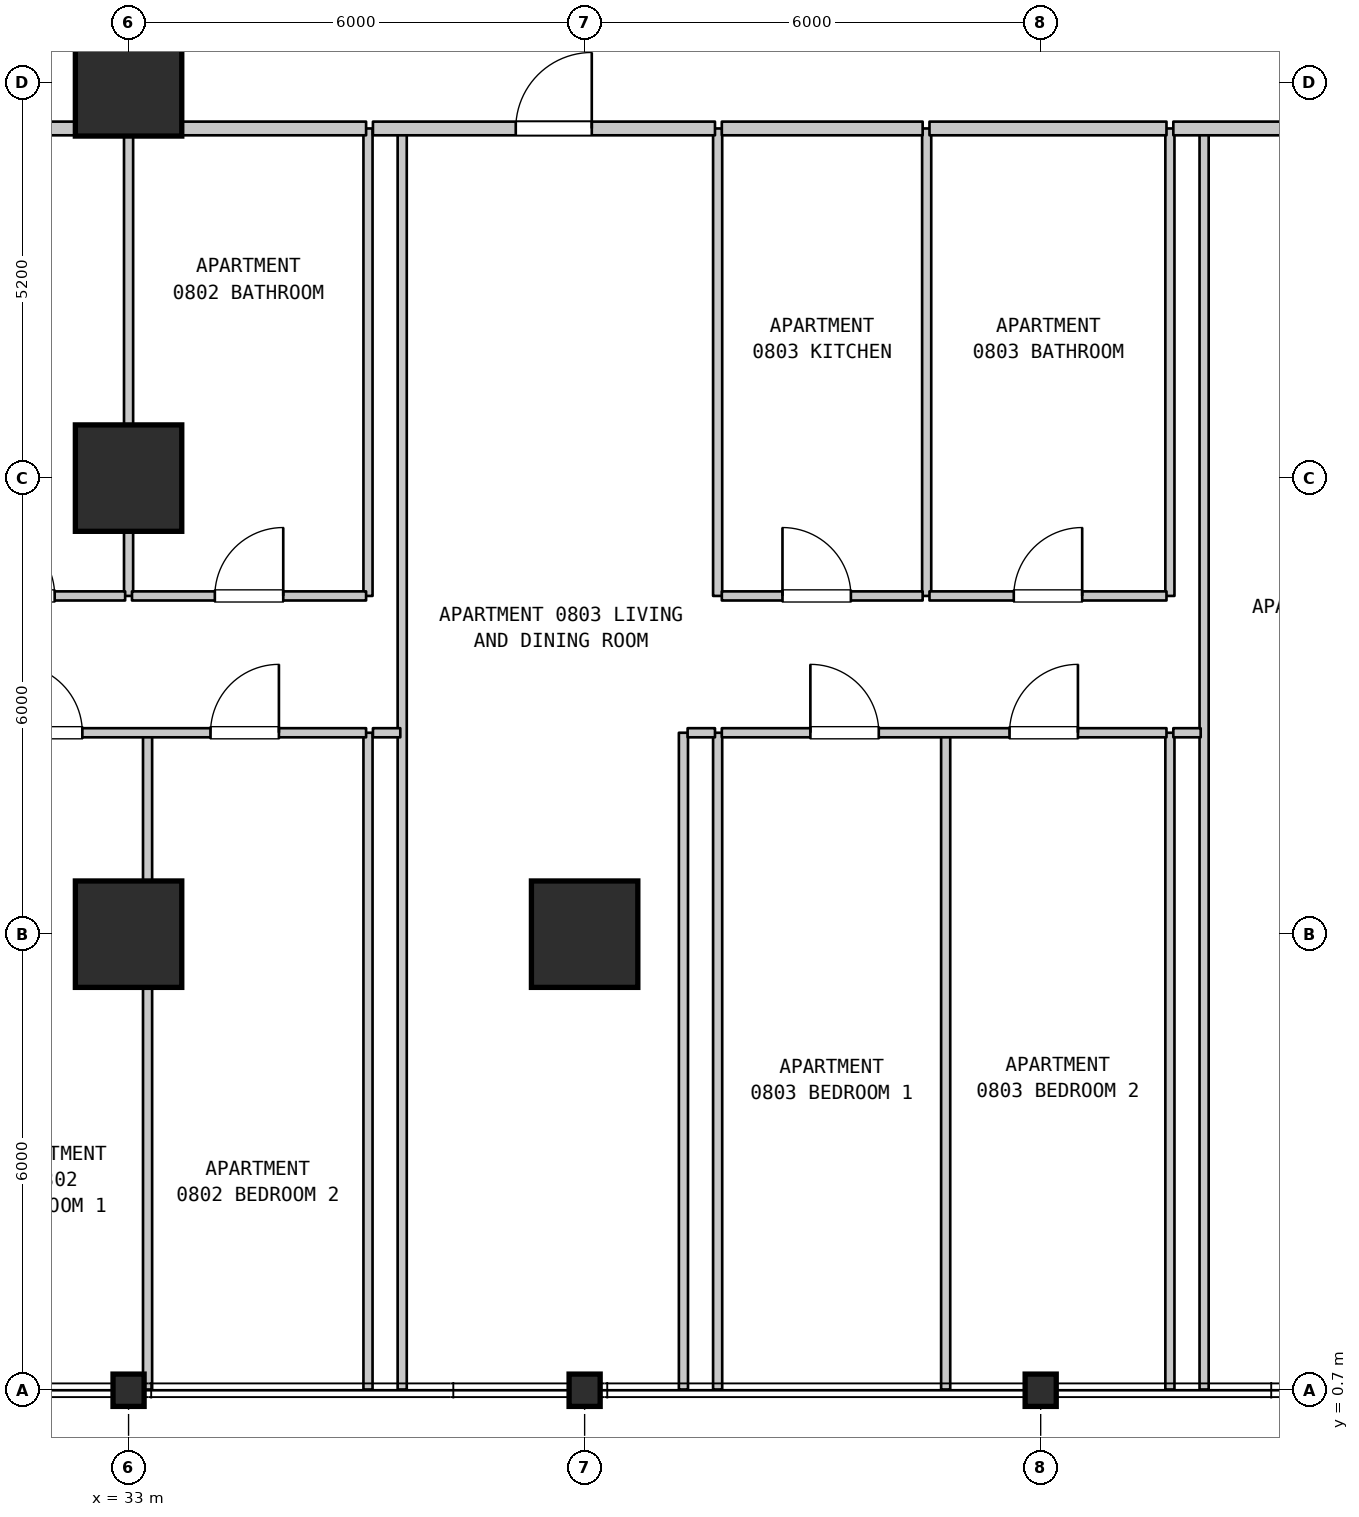
"""IFC4 building model, lengths in metres.
Left out: names, types, materials, properties, quantities, classifications, styles, units other than length and angle.
Written with IfcOpenShell. Run it as: python <this file> out.ifc"""

import sys

from ifc_helpers import new_model, si_unit, direction, frame, frame_2d, origin, origin_2d, place, context, subcontext, project, spatial, rectangle, i_section, extrude, element, fill, save


model = new_model("IFC4")
c1 = context("Model", 3, precision=1e-05, world=origin(), true_north=direction((0.0, 1.0)))
c2 = subcontext(c1, "Body", "Model", "MODEL_VIEW")
j1 = project(units=[si_unit("LENGTHUNIT", "METRE"), si_unit("PLANEANGLEUNIT", "RADIAN")], contexts=[c1])
p1 = place(None, origin())
s1 = spatial("IfcSite", under=j1, at=p1, CompositionType="ELEMENT")
p2 = place(p1, origin())
s2 = spatial("IfcBuilding", under=s1, at=p2, CompositionType="ELEMENT")
p3 = place(p2, frame((0.0, 0.0, 38.8)))
s3 = spatial("IfcBuildingStorey", under=s2, at=p3, CompositionType="ELEMENT", Elevation=38.8)
p4 = place(p3, frame((33.0, 0.7, 0.0), z_axis=(0.0, 0.0, 1.0), x_axis=(1.0, 0.0, 0.0)))
e1 = element("IfcColumn", 1, at=p4, inside=s3, PredefinedType="COLUMN", context=c2, shape_type="SweptSolid", body=[
    extrude(i_section(OverallWidth=0.409, OverallDepth=0.425, WebThickness=0.032, FlangeThickness=0.052, FilletRadius=0.015, at=origin_2d()), origin(), (0.0, 0.0, 1.0), 3.7),
])
for number, where, z_axis, x_axis in (
    (2, (33.0, 6.7, 0.0), (0.0, 0.0, 1.0), (1.0, 0.0, 0.0)),
    (3, (33.0, 12.7, 0.0), (0.0, 0.0, 1.0), (1.0, 0.0, 0.0)),
    (4, (33.0, 17.9, 0.0), (0.0, 0.0, 1.0), (1.0, 0.0, 0.0)),
):
    element("IfcColumn", number, at=place(p3, frame(where, z_axis=z_axis, x_axis=x_axis)), inside=s3, PredefinedType="COLUMN", context=c2, shape_type="SweptSolid", body=[
        extrude(rectangle(XDim=1.4, YDim=1.4, at=origin_2d()), origin(), (0.0, 0.0, 1.0), 3.7),
    ])
p5 = place(p3, frame((39.0, 0.7, 0.0), z_axis=(0.0, 0.0, 1.0), x_axis=(1.0, 0.0, 0.0)))
e5 = element("IfcColumn", 5, at=p5, inside=s3, PredefinedType="COLUMN", context=c2, shape_type="SweptSolid", body=[
    extrude(i_section(OverallWidth=0.409, OverallDepth=0.425, WebThickness=0.032, FlangeThickness=0.052, FilletRadius=0.015, at=origin_2d()), origin(), (0.0, 0.0, 1.0), 3.7),
])
p6 = place(p3, frame((39.0, 6.7, 0.0), z_axis=(0.0, 0.0, 1.0), x_axis=(1.0, 0.0, 0.0)))
e6 = element("IfcColumn", 6, at=p6, inside=s3, PredefinedType="COLUMN", context=c2, shape_type="SweptSolid", body=[
    extrude(rectangle(XDim=1.4, YDim=1.4, at=origin_2d()), origin(), (0.0, 0.0, 1.0), 3.7),
])
p7 = place(p3, frame((45.0, 0.7, 0.0), z_axis=(0.0, 0.0, 1.0), x_axis=(1.0, 0.0, 0.0)))
e7 = element("IfcColumn", 7, at=p7, inside=s3, PredefinedType="COLUMN", context=c2, shape_type="SweptSolid", body=[
    extrude(i_section(OverallWidth=0.409, OverallDepth=0.425, WebThickness=0.032, FlangeThickness=0.052, FilletRadius=0.015, at=origin_2d()), origin(), (0.0, 0.0, 1.0), 3.7),
])
p8 = place(p3, frame((33.0, 11.15, 0.0), z_axis=(0.0, 0.0, 1.0), x_axis=(0.0, 1.0, 0.0)))
e8 = element("IfcWall", 8, at=p8, inside=s3, PredefinedType="PARTITIONING", context=c2, shape_type="SweptSolid", body=[
    extrude(rectangle(XDim=6.15, YDim=0.12, at=frame_2d((3.075, 0.0))), origin(), (0.0, 0.0, 1.0), 2.885),
])
for number, where, z_axis, x_axis in (
    (9, (33.25, 0.71, 0.0), (0.0, 0.0, 1.0), (0.0, 1.0, 0.0)),
    (10, (36.15, 0.71, 0.0), (0.0, 0.0, 1.0), (0.0, 1.0, 0.0)),
):
    element("IfcWall", number, at=place(p3, frame(where, z_axis=z_axis, x_axis=x_axis)), inside=s3, PredefinedType="PARTITIONING", context=c2, shape_type="SweptSolid", body=[
        extrude(rectangle(XDim=8.64, YDim=0.12, at=frame_2d((4.32, 0.0))), origin(), (0.0, 0.0, 1.0), 3.385),
    ])
p9 = place(p3, frame((36.15, 11.15, 0.0), z_axis=(0.0, 0.0, 1.0), x_axis=(0.0, 1.0, 0.0)))
e11 = element("IfcWall", 11, at=p9, inside=s3, PredefinedType="PARTITIONING", context=c2, shape_type="SweptSolid", body=[
    extrude(rectangle(XDim=6.15, YDim=0.12, at=frame_2d((3.075, 0.0))), origin(), (0.0, 0.0, 1.0), 3.385),
])
p10 = place(p3, frame((36.6, 0.71, 0.0), z_axis=(0.0, 0.0, 1.0), x_axis=(0.0, 1.0, 0.0)))
e12 = element("IfcWall", 12, at=p10, inside=s3, PredefinedType="PARTITIONING", context=c2, shape_type="SweptSolid", body=[
    extrude(rectangle(XDim=16.59, YDim=0.12, at=frame_2d((8.295, 0.0))), origin(), (0.0, 0.0, 1.0), 3.385),
])
for number, where, z_axis, x_axis in (
    (13, (40.3, 0.71, 0.0), (0.0, 0.0, 1.0), (0.0, 1.0, 0.0)),
    (14, (40.75, 0.71, 0.0), (0.0, 0.0, 1.0), (0.0, 1.0, 0.0)),
):
    element("IfcWall", number, at=place(p3, frame(where, z_axis=z_axis, x_axis=x_axis)), inside=s3, PredefinedType="PARTITIONING", context=c2, shape_type="SweptSolid", body=[
        extrude(rectangle(XDim=8.64, YDim=0.12, at=frame_2d((4.32, 0.0))), origin(), (0.0, 0.0, 1.0), 3.385),
    ])
for number, where, z_axis, x_axis in (
    (15, (40.75, 11.15, 0.0), (0.0, 0.0, 1.0), (0.0, 1.0, 0.0)),
    (16, (43.5, 11.15, 0.0), (0.0, 0.0, 1.0), (0.0, 1.0, 0.0)),
):
    element("IfcWall", number, at=place(p3, frame(where, z_axis=z_axis, x_axis=x_axis)), inside=s3, PredefinedType="PARTITIONING", context=c2, shape_type="SweptSolid", body=[
        extrude(rectangle(XDim=6.15, YDim=0.12, at=frame_2d((3.075, 0.0))), origin(), (0.0, 0.0, 1.0), 3.385),
    ])
for number, where, z_axis, x_axis in (
    (17, (43.75, 0.71, 0.0), (0.0, 0.0, 1.0), (0.0, 1.0, 0.0)),
    (18, (46.7, 0.71, 0.0), (0.0, 0.0, 1.0), (0.0, 1.0, 0.0)),
):
    element("IfcWall", number, at=place(p3, frame(where, z_axis=z_axis, x_axis=x_axis)), inside=s3, PredefinedType="PARTITIONING", context=c2, shape_type="SweptSolid", body=[
        extrude(rectangle(XDim=8.64, YDim=0.12, at=frame_2d((4.32, 0.0))), origin(), (0.0, 0.0, 1.0), 3.385),
    ])
p11 = place(p3, frame((46.7, 11.15, 0.0), z_axis=(0.0, 0.0, 1.0), x_axis=(0.0, 1.0, 0.0)))
e19 = element("IfcWall", 19, at=p11, inside=s3, PredefinedType="PARTITIONING", context=c2, shape_type="SweptSolid", body=[
    extrude(rectangle(XDim=6.15, YDim=0.12, at=frame_2d((3.075, 0.0))), origin(), (0.0, 0.0, 1.0), 3.385),
])
p12 = place(p3, frame((47.15, 0.71, 0.0), z_axis=(0.0, 0.0, 1.0), x_axis=(0.0, 1.0, 0.0)))
e20 = element("IfcWall", 20, at=p12, inside=s3, PredefinedType="PARTITIONING", context=c2, shape_type="SweptSolid", body=[
    extrude(rectangle(XDim=16.59, YDim=0.12, at=frame_2d((8.295, 0.0))), origin(), (0.0, 0.0, 1.0), 3.385),
])
p13 = place(p3, frame((30.345, 9.35, 0.0), z_axis=(0.0, 0.0, 1.0), x_axis=(1.0, 0.0, 0.0)))
e21 = element("IfcWall", 21, at=p13, inside=s3, PredefinedType="PARTITIONING", context=c2, shape_type="SweptSolid", body=[
    extrude(rectangle(XDim=5.78, YDim=0.12, at=frame_2d((2.89, 0.0))), origin(), (0.0, 0.0, 1.0), 3.385),
])
p14 = place(p13, frame((1.147, 0.0, 0.0)))
e22 = element("IfcOpeningElement", 22, at=p14, cuts=e21, PredefinedType="OPENING", context=c2, shape_type="SweptSolid", body=[
    extrude(rectangle(XDim=0.9, YDim=2.15, at=frame_2d((0.45, 1.075))), frame((0.0, 0.07, 0.0), z_axis=(0.0, -1.0, 0.0), x_axis=(1.0, 0.0, 0.0)), (0.0, 0.0, 1.0), 0.14),
])
p15 = place(p13, frame((3.733, 0.0, 0.0)))
e23 = element("IfcOpeningElement", 23, at=p15, cuts=e21, PredefinedType="OPENING", context=c2, shape_type="SweptSolid", body=[
    extrude(rectangle(XDim=0.9, YDim=2.15, at=frame_2d((0.45, 1.075))), frame((0.0, 0.07, 0.0), z_axis=(0.0, -1.0, 0.0), x_axis=(1.0, 0.0, 0.0)), (0.0, 0.0, 1.0), 0.14),
])
p16 = place(p3, frame((36.215, 9.35, 0.0), z_axis=(0.0, 0.0, 1.0), x_axis=(1.0, 0.0, 0.0)))
e24 = element("IfcWall", 24, at=p16, inside=s3, PredefinedType="PARTITIONING", context=c2, shape_type="SweptSolid", body=[
    extrude(rectangle(XDim=0.36, YDim=0.12, at=frame_2d((0.18, 0.0))), origin(), (0.0, 0.0, 1.0), 3.385),
])
p17 = place(p3, frame((40.355, 9.35, 0.0), z_axis=(0.0, 0.0, 1.0), x_axis=(1.0, 0.0, 0.0)))
e25 = element("IfcWall", 25, at=p17, inside=s3, PredefinedType="PARTITIONING", context=c2, shape_type="SweptSolid", body=[
    extrude(rectangle(XDim=0.36, YDim=0.12, at=frame_2d((0.18, 0.0))), origin(), (0.0, 0.0, 1.0), 3.385),
])
p18 = place(p3, frame((40.805, 9.35, 0.0), z_axis=(0.0, 0.0, 1.0), x_axis=(1.0, 0.0, 0.0)))
e26 = element("IfcWall", 26, at=p18, inside=s3, PredefinedType="PARTITIONING", context=c2, shape_type="SweptSolid", body=[
    extrude(rectangle(XDim=5.85, YDim=0.12, at=frame_2d((2.925, 0.0))), origin(), (0.0, 0.0, 1.0), 3.385),
])
p19 = place(p18, frame((1.165, 0.0, 0.0)))
e27 = element("IfcOpeningElement", 27, at=p19, cuts=e26, PredefinedType="OPENING", context=c2, shape_type="SweptSolid", body=[
    extrude(rectangle(XDim=0.9, YDim=2.15, at=frame_2d((0.45, 1.075))), frame((0.0, 0.07, 0.0), z_axis=(0.0, -1.0, 0.0), x_axis=(1.0, 0.0, 0.0)), (0.0, 0.0, 1.0), 0.14),
])
p20 = place(p18, frame((3.785, 0.0, 0.0)))
e28 = element("IfcOpeningElement", 28, at=p20, cuts=e26, PredefinedType="OPENING", context=c2, shape_type="SweptSolid", body=[
    extrude(rectangle(XDim=0.9, YDim=2.15, at=frame_2d((0.45, 1.075))), frame((0.0, 0.07, 0.0), z_axis=(0.0, -1.0, 0.0), x_axis=(1.0, 0.0, 0.0)), (0.0, 0.0, 1.0), 0.14),
])
p21 = place(p3, frame((46.745, 9.35, 0.0), z_axis=(0.0, 0.0, 1.0), x_axis=(1.0, 0.0, 0.0)))
e29 = element("IfcWall", 29, at=p21, inside=s3, PredefinedType="PARTITIONING", context=c2, shape_type="SweptSolid", body=[
    extrude(rectangle(XDim=0.36, YDim=0.12, at=frame_2d((0.18, 0.0))), origin(), (0.0, 0.0, 1.0), 3.385),
])
p22 = place(p3, frame((30.345, 11.15, 0.0), z_axis=(0.0, 0.0, 1.0), x_axis=(1.0, 0.0, 0.0)))
e30 = element("IfcWall", 30, at=p22, inside=s3, PredefinedType="PARTITIONING", context=c2, shape_type="SweptSolid", body=[
    extrude(rectangle(XDim=2.61, YDim=0.12, at=frame_2d((1.305, 0.0))), origin(), (0.0, 0.0, 1.0), 3.385),
])
p23 = place(p22, frame((0.783, 0.0, 0.0)))
e31 = element("IfcOpeningElement", 31, at=p23, cuts=e30, PredefinedType="OPENING", context=c2, shape_type="SweptSolid", body=[
    extrude(rectangle(XDim=0.9, YDim=2.15, at=frame_2d((0.45, 1.075))), frame((0.0, 0.07, 0.0), z_axis=(0.0, -1.0, 0.0), x_axis=(1.0, 0.0, 0.0)), (0.0, 0.0, 1.0), 0.14),
])
p24 = place(p3, frame((33.045, 11.15, 0.0), z_axis=(0.0, 0.0, 1.0), x_axis=(1.0, 0.0, 0.0)))
e32 = element("IfcWall", 32, at=p24, inside=s3, PredefinedType="PARTITIONING", context=c2, shape_type="SweptSolid", body=[
    extrude(rectangle(XDim=3.08, YDim=0.12, at=frame_2d((1.54, 0.0))), origin(), (0.0, 0.0, 1.0), 3.385),
])
p25 = place(p24, frame((1.09, 0.0, 0.0)))
e33 = element("IfcOpeningElement", 33, at=p25, cuts=e32, PredefinedType="OPENING", context=c2, shape_type="SweptSolid", body=[
    extrude(rectangle(XDim=0.9, YDim=2.1, at=frame_2d((0.45, 1.05))), frame((0.0, 0.07, 0.0), z_axis=(0.0, -1.0, 0.0), x_axis=(1.0, 0.0, 0.0)), (0.0, 0.0, 1.0), 0.14),
])
p26 = place(p3, frame((40.805, 11.15, 0.0), z_axis=(0.0, 0.0, 1.0), x_axis=(1.0, 0.0, 0.0)))
e34 = element("IfcWall", 34, at=p26, inside=s3, PredefinedType="PARTITIONING", context=c2, shape_type="SweptSolid", body=[
    extrude(rectangle(XDim=2.642, YDim=0.12, at=frame_2d((1.321, 0.0))), origin(), (0.0, 0.0, 1.0), 3.385),
])
p27 = place(p26, frame((0.798, 0.0, 0.0)))
e35 = element("IfcOpeningElement", 35, at=p27, cuts=e34, PredefinedType="OPENING", context=c2, shape_type="SweptSolid", body=[
    extrude(rectangle(XDim=0.9, YDim=2.15, at=frame_2d((0.45, 1.075))), frame((0.0, 0.07, 0.0), z_axis=(0.0, -1.0, 0.0), x_axis=(1.0, 0.0, 0.0)), (0.0, 0.0, 1.0), 0.14),
])
p28 = place(p3, frame((43.537, 11.15, 0.0), z_axis=(0.0, 0.0, 1.0), x_axis=(1.0, 0.0, 0.0)))
e36 = element("IfcWall", 36, at=p28, inside=s3, PredefinedType="PARTITIONING", context=c2, shape_type="SweptSolid", body=[
    extrude(rectangle(XDim=3.118, YDim=0.12, at=frame_2d((1.559, 0.0))), origin(), (0.0, 0.0, 1.0), 3.385),
])
p29 = place(p28, frame((1.109, 0.0, 0.0)))
e37 = element("IfcOpeningElement", 37, at=p29, cuts=e36, PredefinedType="OPENING", context=c2, shape_type="SweptSolid", body=[
    extrude(rectangle(XDim=0.9, YDim=2.1, at=frame_2d((0.45, 1.05))), frame((0.0, 0.07, 0.0), z_axis=(0.0, -1.0, 0.0), x_axis=(1.0, 0.0, 0.0)), (0.0, 0.0, 1.0), 0.14),
])
p30 = place(p3, frame((30.345, 17.3, 0.0), z_axis=(0.0, 0.0, 1.0), x_axis=(1.0, 0.0, 0.0)))
e38 = element("IfcWall", 38, at=p30, inside=s3, PredefinedType="STANDARD", context=c2, shape_type="SweptSolid", body=[
    extrude(rectangle(XDim=2.61, YDim=0.18, at=frame_2d((1.305, 0.0))), origin(), (0.0, 0.0, 1.0), 3.385),
])
p31 = place(p3, frame((33.045, 17.3, 0.0), z_axis=(0.0, 0.0, 1.0), x_axis=(1.0, 0.0, 0.0)))
e39 = element("IfcWall", 39, at=p31, inside=s3, PredefinedType="STANDARD", context=c2, shape_type="SweptSolid", body=[
    extrude(rectangle(XDim=3.08, YDim=0.18, at=frame_2d((1.54, 0.0))), origin(), (0.0, 0.0, 1.0), 3.385),
])
p32 = place(p3, frame((36.215, 17.3, 0.0), z_axis=(0.0, 0.0, 1.0), x_axis=(1.0, 0.0, 0.0)))
e40 = element("IfcWall", 40, at=p32, inside=s3, PredefinedType="STANDARD", context=c2, shape_type="SweptSolid", body=[
    extrude(rectangle(XDim=4.5, YDim=0.18, at=frame_2d((2.25, 0.0))), origin(), (0.0, 0.0, 1.0), 3.385),
])
p33 = place(p32, frame((1.879, 0.0, 0.0)))
e41 = element("IfcOpeningElement", 41, at=p33, cuts=e40, PredefinedType="OPENING", context=c2, shape_type="SweptSolid", body=[
    extrude(rectangle(XDim=1.0, YDim=2.15, at=frame_2d((0.5, 1.075))), frame((0.0, 0.1, 0.0), z_axis=(0.0, -1.0, 0.0), x_axis=(1.0, 0.0, 0.0)), (0.0, 0.0, 1.0), 0.2),
])
p34 = place(p3, frame((40.805, 17.3, 0.0), z_axis=(0.0, 0.0, 1.0), x_axis=(1.0, 0.0, 0.0)))
e42 = element("IfcWall", 42, at=p34, inside=s3, PredefinedType="STANDARD", context=c2, shape_type="SweptSolid", body=[
    extrude(rectangle(XDim=2.642, YDim=0.18, at=frame_2d((1.321, 0.0))), origin(), (0.0, 0.0, 1.0), 3.385),
])
p35 = place(p3, frame((43.537, 17.3, 0.0), z_axis=(0.0, 0.0, 1.0), x_axis=(1.0, 0.0, 0.0)))
e43 = element("IfcWall", 43, at=p35, inside=s3, PredefinedType="STANDARD", context=c2, shape_type="SweptSolid", body=[
    extrude(rectangle(XDim=3.118, YDim=0.18, at=frame_2d((1.559, 0.0))), origin(), (0.0, 0.0, 1.0), 3.385),
])
p36 = place(p3, frame((46.745, 17.3, 0.0), z_axis=(0.0, 0.0, 1.0), x_axis=(1.0, 0.0, 0.0)))
e44 = element("IfcWall", 44, at=p36, inside=s3, PredefinedType="STANDARD", context=c2, shape_type="SweptSolid", body=[
    extrude(rectangle(XDim=4.8, YDim=0.18, at=frame_2d((2.4, 0.0))), origin(), (0.0, 0.0, 1.0), 3.385),
])
p37 = place(p36, frame((1.9, 0.0, 0.0)))
e45 = element("IfcOpeningElement", 45, at=p37, cuts=e44, PredefinedType="OPENING", context=c2, shape_type="SweptSolid", body=[
    extrude(rectangle(XDim=1.0, YDim=2.15, at=frame_2d((0.5, 1.075))), frame((0.0, 0.1, 0.0), z_axis=(0.0, -1.0, 0.0), x_axis=(1.0, 0.0, 0.0)), (0.0, 0.0, 1.0), 0.2),
])
p38 = place(p14, origin())
e46 = element("IfcDoor", 46, at=p38, inside=s3, OperationType="SINGLE_SWING_LEFT", PredefinedType="DOOR", context=c2, shape_type="SweptSolid", body=[
    extrude(rectangle(XDim=0.9, YDim=2.15, at=frame_2d((0.45, 1.075))), frame((0.0, 0.025, 0.0), z_axis=(0.0, -1.0, 0.0), x_axis=(1.0, 0.0, 0.0)), (0.0, 0.0, 1.0), 0.05),
])
fill(e22, e46)
p39 = place(p15, origin())
e47 = element("IfcDoor", 47, at=p39, inside=s3, OperationType="SINGLE_SWING_RIGHT", PredefinedType="DOOR", context=c2, shape_type="SweptSolid", body=[
    extrude(rectangle(XDim=0.9, YDim=2.15, at=frame_2d((0.45, 1.075))), frame((0.0, 0.025, 0.0), z_axis=(0.0, -1.0, 0.0), x_axis=(1.0, 0.0, 0.0)), (0.0, 0.0, 1.0), 0.05),
])
fill(e23, e47)
p40 = place(p19, origin())
e48 = element("IfcDoor", 48, at=p40, inside=s3, OperationType="SINGLE_SWING_LEFT", PredefinedType="DOOR", context=c2, shape_type="SweptSolid", body=[
    extrude(rectangle(XDim=0.9, YDim=2.15, at=frame_2d((0.45, 1.075))), frame((0.0, 0.025, 0.0), z_axis=(0.0, -1.0, 0.0), x_axis=(1.0, 0.0, 0.0)), (0.0, 0.0, 1.0), 0.05),
])
fill(e27, e48)
p41 = place(p20, origin())
e49 = element("IfcDoor", 49, at=p41, inside=s3, OperationType="SINGLE_SWING_RIGHT", PredefinedType="DOOR", context=c2, shape_type="SweptSolid", body=[
    extrude(rectangle(XDim=0.9, YDim=2.15, at=frame_2d((0.45, 1.075))), frame((0.0, 0.025, 0.0), z_axis=(0.0, -1.0, 0.0), x_axis=(1.0, 0.0, 0.0)), (0.0, 0.0, 1.0), 0.05),
])
fill(e28, e49)
p42 = place(p23, origin())
e50 = element("IfcDoor", 50, at=p42, inside=s3, OperationType="SINGLE_SWING_LEFT", PredefinedType="DOOR", context=c2, shape_type="SweptSolid", body=[
    extrude(rectangle(XDim=0.9, YDim=2.15, at=frame_2d((0.45, 1.075))), frame((0.0, 0.025, 0.0), z_axis=(0.0, -1.0, 0.0), x_axis=(1.0, 0.0, 0.0)), (0.0, 0.0, 1.0), 0.05),
])
fill(e31, e50)
p43 = place(p25, origin())
e51 = element("IfcDoor", 51, at=p43, inside=s3, OperationType="SINGLE_SWING_RIGHT", PredefinedType="DOOR", context=c2, shape_type="SweptSolid", body=[
    extrude(rectangle(XDim=0.9, YDim=2.1, at=frame_2d((0.45, 1.05))), frame((0.0, 0.025, 0.0), z_axis=(0.0, -1.0, 0.0), x_axis=(1.0, 0.0, 0.0)), (0.0, 0.0, 1.0), 0.05),
])
fill(e33, e51)
p44 = place(p27, origin())
e52 = element("IfcDoor", 52, at=p44, inside=s3, OperationType="SINGLE_SWING_LEFT", PredefinedType="DOOR", context=c2, shape_type="SweptSolid", body=[
    extrude(rectangle(XDim=0.9, YDim=2.15, at=frame_2d((0.45, 1.075))), frame((0.0, 0.025, 0.0), z_axis=(0.0, -1.0, 0.0), x_axis=(1.0, 0.0, 0.0)), (0.0, 0.0, 1.0), 0.05),
])
fill(e35, e52)
p45 = place(p29, origin())
e53 = element("IfcDoor", 53, at=p45, inside=s3, OperationType="SINGLE_SWING_RIGHT", PredefinedType="DOOR", context=c2, shape_type="SweptSolid", body=[
    extrude(rectangle(XDim=0.9, YDim=2.1, at=frame_2d((0.45, 1.05))), frame((0.0, 0.025, 0.0), z_axis=(0.0, -1.0, 0.0), x_axis=(1.0, 0.0, 0.0)), (0.0, 0.0, 1.0), 0.05),
])
fill(e37, e53)
p46 = place(p33, origin())
e54 = element("IfcDoor", 54, at=p46, inside=s3, OperationType="SINGLE_SWING_RIGHT", PredefinedType="DOOR", context=c2, shape_type="SweptSolid", body=[
    extrude(rectangle(XDim=1.0, YDim=2.15, at=frame_2d((0.5, 1.075))), frame((0.0, 0.025, 0.0), z_axis=(0.0, -1.0, 0.0), x_axis=(1.0, 0.0, 0.0)), (0.0, 0.0, 1.0), 0.05),
])
fill(e41, e54)
save(model, sys.argv[1])
